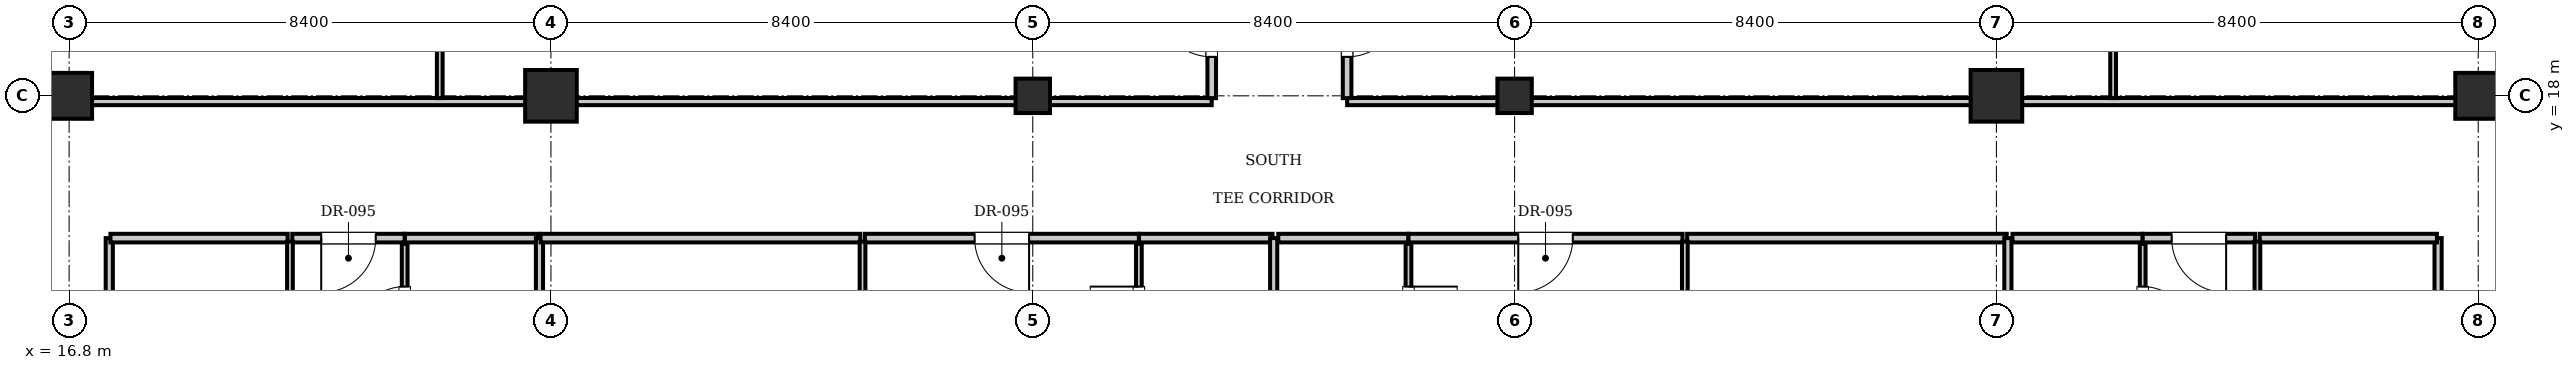
"""IFC4 building model, lengths in metres.
Left out: names, types, materials, properties, quantities, classifications, styles, units other than length and angle.
Written with IfcOpenShell. Run it as: python <this file> out.ifc"""

import sys

from ifc_helpers import new_model, si_unit, direction, frame, frame_2d, origin, origin_2d, place, context, subcontext, project, spatial, rectangle, i_section, extrude, element, fill, save


model = new_model("IFC4")
c1 = context("Model", 3, precision=1e-05, world=origin(), true_north=direction((0.0, 1.0)))
c2 = subcontext(c1, "Body", "Model", "MODEL_VIEW")
j1 = project(units=[si_unit("LENGTHUNIT", "METRE"), si_unit("PLANEANGLEUNIT", "RADIAN")], contexts=[c1])
p1 = place(None, origin())
s1 = spatial("IfcSite", under=j1, at=p1, CompositionType="ELEMENT")
p2 = place(p1, origin())
s2 = spatial("IfcBuilding", under=s1, at=p2, CompositionType="ELEMENT")
p3 = place(p2, frame((0.0, 0.0, 212.1)))
s3 = spatial("IfcBuildingStorey", under=s2, at=p3, CompositionType="ELEMENT", Elevation=212.1)
for number, where, z_axis, x_axis in (
    (1, (25.2, 18.0, 0.0), (0.0, 0.0, 1.0), (1.0, 0.0, 0.0)),
    (2, (50.4, 18.0, 0.0), (0.0, 0.0, 1.0), (1.0, 0.0, 0.0)),
):
    element("IfcColumn", number, at=place(p3, frame(where, z_axis=z_axis, x_axis=x_axis)), inside=s3, PredefinedType="COLUMN", context=c2, shape_type="SweptSolid", body=[
        extrude(rectangle(XDim=0.9, YDim=0.9, at=origin_2d()), origin(), (0.0, 0.0, 1.0), 3.85),
    ])
for number, where, z_axis, x_axis in (
    (3, (33.6, 18.0, 0.0), (0.0, 0.0, 1.0), (1.0, 0.0, 0.0)),
    (4, (42.0, 18.0, 0.0), (0.0, 0.0, 1.0), (1.0, 0.0, 0.0)),
):
    element("IfcColumn", number, at=place(p3, frame(where, z_axis=z_axis, x_axis=x_axis)), inside=s3, PredefinedType="COLUMN", context=c2, shape_type="SweptSolid", body=[
        extrude(i_section(OverallWidth=0.6, OverallDepth=0.6, WebThickness=0.025, FlangeThickness=0.038, at=origin_2d()), origin(), (0.0, 0.0, 1.0), 3.85),
    ])
for number, where, z_axis, x_axis in (
    (5, (16.8, 18.0, 0.0), (0.0, 0.0, 1.0), (1.0, 0.0, 0.0)),
    (6, (58.8, 18.0, 0.0), (0.0, 0.0, 1.0), (1.0, 0.0, 0.0)),
):
    element("IfcColumn", number, at=place(p3, frame(where, z_axis=z_axis, x_axis=x_axis)), inside=s3, PredefinedType="COLUMN", context=c2, shape_type="SweptSolid", body=[
        extrude(rectangle(XDim=0.8, YDim=0.8, at=origin_2d()), origin(), (0.0, 0.0, 1.0), 3.85),
    ])
for number, where, z_axis, x_axis in (
    (7, (17.5, 9.0, 0.0), (0.0, 0.0, 1.0), (0.0, 1.0, 0.0)),
    (8, (58.1, 9.0, 0.0), (0.0, 0.0, 1.0), (0.0, 1.0, 0.0)),
):
    element("IfcWall", number, at=place(p3, frame(where, z_axis=z_axis, x_axis=x_axis)), inside=s3, PredefinedType="PARTITIONING", context=c2, shape_type="SweptSolid", body=[
        extrude(rectangle(XDim=6.52, YDim=0.125, at=frame_2d((3.26, 0.0))), origin(), (0.0, 0.0, 1.0), 3.61),
    ])
p4 = place(p3, frame((22.65, 15.52, 0.0), z_axis=(0.0, 0.0, 1.0), x_axis=(1.0, 0.0, 0.0)))
e9 = element("IfcWall", 9, at=p4, inside=s3, PredefinedType="PARTITIONING", context=c2, shape_type="SweptSolid", body=[
    extrude(rectangle(XDim=2.33, YDim=0.15, at=frame_2d((1.165, 0.0))), origin(), (0.0, 0.0, 1.0), 3.61),
])
p5 = place(p3, frame((22.65, 13.08, 0.0), z_axis=(0.0, 0.0, 1.0), x_axis=(0.0, 1.0, 0.0)))
e10 = element("IfcWall", 10, at=p5, inside=s3, PredefinedType="PARTITIONING", context=c2, shape_type="SweptSolid", body=[
    extrude(rectangle(XDim=2.34, YDim=0.1, at=frame_2d((1.17, 0.0))), origin(), (0.0, 0.0, 1.0), 3.61),
])
p6 = place(p5, frame((0.745, 0.0, 0.0)))
e11 = element("IfcOpeningElement", 11, at=p6, cuts=e10, PredefinedType="OPENING", context=c2, shape_type="SweptSolid", body=[
    extrude(rectangle(XDim=0.85, YDim=2.1, at=frame_2d((0.425, 1.05))), frame((0.0, 0.06, 0.0), z_axis=(0.0, -1.0, 0.0), x_axis=(1.0, 0.0, 0.0)), (0.0, 0.0, 1.0), 0.12),
])
p7 = place(p3, frame((17.52, 15.52, 0.0), z_axis=(0.0, 0.0, 1.0), x_axis=(1.0, 0.0, 0.0)))
e12 = element("IfcWall", 12, at=p7, inside=s3, PredefinedType="PARTITIONING", context=c2, shape_type="SweptSolid", body=[
    extrude(rectangle(XDim=3.09, YDim=0.15, at=frame_2d((1.545, 0.0))), origin(), (0.0, 0.0, 1.0), 3.61),
])
p8 = place(p3, frame((20.69, 15.52, 0.0), z_axis=(0.0, 0.0, 1.0), x_axis=(1.0, 0.0, 0.0)))
e13 = element("IfcWall", 13, at=p8, inside=s3, PredefinedType="PARTITIONING", context=c2, shape_type="SweptSolid", body=[
    extrude(rectangle(XDim=1.96, YDim=0.15, at=frame_2d((0.98, 0.0))), origin(), (0.0, 0.0, 1.0), 3.61),
])
p9 = place(p8, frame((0.505, 0.0, 0.0)))
e14 = element("IfcOpeningElement", 14, at=p9, cuts=e13, PredefinedType="OPENING", context=c2, shape_type="SweptSolid", body=[
    extrude(rectangle(XDim=0.95, YDim=2.15, at=frame_2d((0.475, 1.075))), frame((0.0, 0.085, 0.0), z_axis=(0.0, -1.0, 0.0), x_axis=(1.0, 0.0, 0.0)), (0.0, 0.0, 1.0), 0.17),
])
p10 = place(p3, frame((20.65, 4.63, 0.0), z_axis=(0.0, 0.0, 1.0), x_axis=(0.0, 1.0, 0.0)))
e15 = element("IfcWall", 15, at=p10, inside=s3, PredefinedType="PARTITIONING", context=c2, shape_type="SweptSolid", body=[
    extrude(rectangle(XDim=10.83, YDim=0.1, at=frame_2d((5.415, 0.0))), origin(), (0.0, 0.0, 1.0), 3.61),
])
p11 = place(p10, frame((1.6, 0.0, 0.0)))
e16 = element("IfcOpeningElement", 16, at=p11, cuts=e15, PredefinedType="OPENING", context=c2, shape_type="SweptSolid", body=[
    extrude(rectangle(XDim=0.9, YDim=2.1, at=frame_2d((0.45, 1.05))), frame((0.0, 0.06, 0.0), z_axis=(0.0, -1.0, 0.0), x_axis=(1.0, 0.0, 0.0)), (0.0, 0.0, 1.0), 0.12),
])
p12 = place(p3, frame((25.0, 4.7, 0.0), z_axis=(0.0, 0.0, 1.0), x_axis=(0.0, 1.0, 0.0)))
e17 = element("IfcWall", 17, at=p12, inside=s3, PredefinedType="PARTITIONING", context=c2, shape_type="SweptSolid", body=[
    extrude(rectangle(XDim=10.82, YDim=0.125, at=frame_2d((5.41, 0.0))), origin(), (0.0, 0.0, 1.0), 3.61),
])
p13 = place(p3, frame((35.45, 15.52, 0.0), z_axis=(0.0, 0.0, 1.0), x_axis=(1.0, 0.0, 0.0)))
e18 = element("IfcWall", 18, at=p13, inside=s3, PredefinedType="PARTITIONING", context=c2, shape_type="SweptSolid", body=[
    extrude(rectangle(XDim=2.33, YDim=0.15, at=frame_2d((1.165, 0.0))), origin(), (0.0, 0.0, 1.0), 3.61),
])
p14 = place(p3, frame((35.45, 13.08, 0.0), z_axis=(0.0, 0.0, 1.0), x_axis=(0.0, 1.0, 0.0)))
e19 = element("IfcWall", 19, at=p14, inside=s3, PredefinedType="PARTITIONING", context=c2, shape_type="SweptSolid", body=[
    extrude(rectangle(XDim=2.34, YDim=0.1, at=frame_2d((1.17, 0.0))), origin(), (0.0, 0.0, 1.0), 3.61),
])
p15 = place(p14, frame((0.745, 0.0, 0.0)))
e20 = element("IfcOpeningElement", 20, at=p15, cuts=e19, PredefinedType="OPENING", context=c2, shape_type="SweptSolid", body=[
    extrude(rectangle(XDim=0.85, YDim=2.1, at=frame_2d((0.425, 1.05))), frame((0.0, 0.06, 0.0), z_axis=(0.0, -1.0, 0.0), x_axis=(1.0, 0.0, 0.0)), (0.0, 0.0, 1.0), 0.12),
])
p16 = place(p3, frame((25.02, 15.52, 0.0), z_axis=(0.0, 0.0, 1.0), x_axis=(1.0, 0.0, 0.0)))
e21 = element("IfcWall", 21, at=p16, inside=s3, PredefinedType="PARTITIONING", context=c2, shape_type="SweptSolid", body=[
    extrude(rectangle(XDim=5.572, YDim=0.15, at=frame_2d((2.786, 0.0))), origin(), (0.0, 0.0, 1.0), 3.61),
])
p17 = place(p3, frame((30.672, 15.52, 0.0), z_axis=(0.0, 0.0, 1.0), x_axis=(1.0, 0.0, 0.0)))
e22 = element("IfcWall", 22, at=p17, inside=s3, PredefinedType="PARTITIONING", context=c2, shape_type="SweptSolid", body=[
    extrude(rectangle(XDim=4.778, YDim=0.15, at=frame_2d((2.389, 0.0))), origin(), (0.0, 0.0, 1.0), 3.61),
])
p18 = place(p17, frame((1.914, 0.0, 0.0)))
e23 = element("IfcOpeningElement", 23, at=p18, cuts=e22, PredefinedType="OPENING", context=c2, shape_type="SweptSolid", body=[
    extrude(rectangle(XDim=0.95, YDim=2.15, at=frame_2d((0.475, 1.075))), frame((0.0, 0.085, 0.0), z_axis=(0.0, -1.0, 0.0), x_axis=(1.0, 0.0, 0.0)), (0.0, 0.0, 1.0), 0.17),
])
p19 = place(p3, frame((30.632, 4.63, 0.0), z_axis=(0.0, 0.0, 1.0), x_axis=(0.0, 1.0, 0.0)))
e24 = element("IfcWall", 24, at=p19, inside=s3, PredefinedType="PARTITIONING", context=c2, shape_type="SweptSolid", body=[
    extrude(rectangle(XDim=10.83, YDim=0.1, at=frame_2d((5.415, 0.0))), origin(), (0.0, 0.0, 1.0), 3.61),
])
p20 = place(p19, frame((1.6, 0.0, 0.0)))
e25 = element("IfcOpeningElement", 25, at=p20, cuts=e24, PredefinedType="OPENING", context=c2, shape_type="SweptSolid", body=[
    extrude(rectangle(XDim=0.9, YDim=2.1, at=frame_2d((0.45, 1.05))), frame((0.0, 0.06, 0.0), z_axis=(0.0, -1.0, 0.0), x_axis=(1.0, 0.0, 0.0)), (0.0, 0.0, 1.0), 0.12),
])
p21 = place(p3, frame((37.8, 4.7, 0.0), z_axis=(0.0, 0.0, 1.0), x_axis=(0.0, 1.0, 0.0)))
e26 = element("IfcWall", 26, at=p21, inside=s3, PredefinedType="PARTITIONING", context=c2, shape_type="SweptSolid", body=[
    extrude(rectangle(XDim=10.82, YDim=0.125, at=frame_2d((5.41, 0.0))), origin(), (0.0, 0.0, 1.0), 3.207),
])
p22 = place(p3, frame((37.88, 15.52, 0.0), z_axis=(0.0, 0.0, 1.0), x_axis=(1.0, 0.0, 0.0)))
e27 = element("IfcWall", 27, at=p22, inside=s3, PredefinedType="PARTITIONING", context=c2, shape_type="SweptSolid", body=[
    extrude(rectangle(XDim=2.27, YDim=0.15, at=frame_2d((1.135, 0.0))), origin(), (0.0, 0.0, 1.0), 3.61),
])
p23 = place(p3, frame((40.15, 13.08, 0.0), z_axis=(0.0, 0.0, 1.0), x_axis=(0.0, 1.0, 0.0)))
e28 = element("IfcWall", 28, at=p23, inside=s3, PredefinedType="PARTITIONING", context=c2, shape_type="SweptSolid", body=[
    extrude(rectangle(XDim=2.34, YDim=0.1, at=frame_2d((1.17, 0.0))), origin(), (0.0, 0.0, 1.0), 3.61),
])
p24 = place(p23, frame((0.745, 0.0, 0.0)))
e29 = element("IfcOpeningElement", 29, at=p24, cuts=e28, PredefinedType="OPENING", context=c2, shape_type="SweptSolid", body=[
    extrude(rectangle(XDim=0.85, YDim=2.1, at=frame_2d((0.425, 1.05))), frame((0.0, 0.06, 0.0), z_axis=(0.0, -1.0, 0.0), x_axis=(1.0, 0.0, 0.0)), (0.0, 0.0, 1.0), 0.12),
])
p25 = place(p3, frame((40.15, 15.52, 0.0), z_axis=(0.0, 0.0, 1.0), x_axis=(1.0, 0.0, 0.0)))
e30 = element("IfcWall", 30, at=p25, inside=s3, PredefinedType="PARTITIONING", context=c2, shape_type="SweptSolid", body=[
    extrude(rectangle(XDim=4.778, YDim=0.15, at=frame_2d((2.389, 0.0))), origin(), (0.0, 0.0, 1.0), 3.61),
])
p26 = place(p25, frame((1.914, 0.0, 0.0)))
e31 = element("IfcOpeningElement", 31, at=p26, cuts=e30, PredefinedType="OPENING", context=c2, shape_type="SweptSolid", body=[
    extrude(rectangle(XDim=0.95, YDim=2.15, at=frame_2d((0.475, 1.075))), frame((0.0, 0.085, 0.0), z_axis=(0.0, -1.0, 0.0), x_axis=(1.0, 0.0, 0.0)), (0.0, 0.0, 1.0), 0.17),
])
p27 = place(p3, frame((45.008, 15.52, 0.0), z_axis=(0.0, 0.0, 1.0), x_axis=(1.0, 0.0, 0.0)))
e32 = element("IfcWall", 32, at=p27, inside=s3, PredefinedType="PARTITIONING", context=c2, shape_type="SweptSolid", body=[
    extrude(rectangle(XDim=5.572, YDim=0.15, at=frame_2d((2.786, 0.0))), origin(), (0.0, 0.0, 1.0), 3.61),
])
p28 = place(p3, frame((44.968, 4.63, 0.0), z_axis=(0.0, 0.0, 1.0), x_axis=(0.0, 1.0, 0.0)))
e33 = element("IfcWall", 33, at=p28, inside=s3, PredefinedType="PARTITIONING", context=c2, shape_type="SweptSolid", body=[
    extrude(rectangle(XDim=10.83, YDim=0.1, at=frame_2d((5.415, 0.0))), origin(), (0.0, 0.0, 1.0), 3.61),
])
p29 = place(p28, frame((1.6, 0.0, 0.0)))
e34 = element("IfcOpeningElement", 34, at=p29, cuts=e33, PredefinedType="OPENING", context=c2, shape_type="SweptSolid", body=[
    extrude(rectangle(XDim=0.9, YDim=2.1, at=frame_2d((0.45, 1.05))), frame((0.0, 0.06, 0.0), z_axis=(0.0, -1.0, 0.0), x_axis=(1.0, 0.0, 0.0)), (0.0, 0.0, 1.0), 0.12),
])
p30 = place(p3, frame((50.6, 4.7, 0.0), z_axis=(0.0, 0.0, 1.0), x_axis=(0.0, 1.0, 0.0)))
e35 = element("IfcWall", 35, at=p30, inside=s3, PredefinedType="PARTITIONING", context=c2, shape_type="SweptSolid", body=[
    extrude(rectangle(XDim=10.82, YDim=0.125, at=frame_2d((5.41, 0.0))), origin(), (0.0, 0.0, 1.0), 3.61),
])
p31 = place(p3, frame((50.68, 15.52, 0.0), z_axis=(0.0, 0.0, 1.0), x_axis=(1.0, 0.0, 0.0)))
e36 = element("IfcWall", 36, at=p31, inside=s3, PredefinedType="PARTITIONING", context=c2, shape_type="SweptSolid", body=[
    extrude(rectangle(XDim=2.27, YDim=0.15, at=frame_2d((1.135, 0.0))), origin(), (0.0, 0.0, 1.0), 3.61),
])
p32 = place(p3, frame((52.95, 13.08, 0.0), z_axis=(0.0, 0.0, 1.0), x_axis=(0.0, 1.0, 0.0)))
e37 = element("IfcWall", 37, at=p32, inside=s3, PredefinedType="PARTITIONING", context=c2, shape_type="SweptSolid", body=[
    extrude(rectangle(XDim=2.34, YDim=0.1, at=frame_2d((1.17, 0.0))), origin(), (0.0, 0.0, 1.0), 3.61),
])
p33 = place(p32, frame((0.745, 0.0, 0.0)))
e38 = element("IfcOpeningElement", 38, at=p33, cuts=e37, PredefinedType="OPENING", context=c2, shape_type="SweptSolid", body=[
    extrude(rectangle(XDim=0.85, YDim=2.1, at=frame_2d((0.425, 1.05))), frame((0.0, 0.06, 0.0), z_axis=(0.0, -1.0, 0.0), x_axis=(1.0, 0.0, 0.0)), (0.0, 0.0, 1.0), 0.12),
])
p34 = place(p3, frame((52.95, 15.52, 0.0), z_axis=(0.0, 0.0, 1.0), x_axis=(1.0, 0.0, 0.0)))
e39 = element("IfcWall", 39, at=p34, inside=s3, PredefinedType="PARTITIONING", context=c2, shape_type="SweptSolid", body=[
    extrude(rectangle(XDim=1.96, YDim=0.15, at=frame_2d((0.98, 0.0))), origin(), (0.0, 0.0, 1.0), 3.61),
])
p35 = place(p34, frame((0.505, 0.0, 0.0)))
e40 = element("IfcOpeningElement", 40, at=p35, cuts=e39, PredefinedType="OPENING", context=c2, shape_type="SweptSolid", body=[
    extrude(rectangle(XDim=0.95, YDim=2.15, at=frame_2d((0.475, 1.075))), frame((0.0, 0.085, 0.0), z_axis=(0.0, -1.0, 0.0), x_axis=(1.0, 0.0, 0.0)), (0.0, 0.0, 1.0), 0.17),
])
p36 = place(p3, frame((54.99, 15.52, 0.0), z_axis=(0.0, 0.0, 1.0), x_axis=(1.0, 0.0, 0.0)))
e41 = element("IfcWall", 41, at=p36, inside=s3, PredefinedType="PARTITIONING", context=c2, shape_type="SweptSolid", body=[
    extrude(rectangle(XDim=3.09, YDim=0.15, at=frame_2d((1.545, 0.0))), origin(), (0.0, 0.0, 1.0), 3.61),
])
p37 = place(p3, frame((54.95, 4.63, 0.0), z_axis=(0.0, 0.0, 1.0), x_axis=(0.0, 1.0, 0.0)))
e42 = element("IfcWall", 42, at=p37, inside=s3, PredefinedType="PARTITIONING", context=c2, shape_type="SweptSolid", body=[
    extrude(rectangle(XDim=10.83, YDim=0.1, at=frame_2d((5.415, 0.0))), origin(), (0.0, 0.0, 1.0), 3.61),
])
p38 = place(p37, frame((1.6, 0.0, 0.0)))
e43 = element("IfcOpeningElement", 43, at=p38, cuts=e42, PredefinedType="OPENING", context=c2, shape_type="SweptSolid", body=[
    extrude(rectangle(XDim=0.9, YDim=2.1, at=frame_2d((0.45, 1.05))), frame((0.0, 0.06, 0.0), z_axis=(0.0, -1.0, 0.0), x_axis=(1.0, 0.0, 0.0)), (0.0, 0.0, 1.0), 0.12),
])
p39 = place(p3, frame((13.2, 17.9, 0.0), z_axis=(0.0, 0.0, 1.0), x_axis=(1.0, 0.0, 0.0)))
e44 = element("IfcWall", 44, at=p39, inside=s3, PredefinedType="PARTITIONING", context=c2, shape_type="SweptSolid", body=[
    extrude(rectangle(XDim=23.52, YDim=0.125, at=frame_2d((11.76, 0.0))), origin(), (0.0, 0.0, 1.0), 3.071),
])
p40 = place(p3, frame((39.08, 17.9, 0.0), z_axis=(0.0, 0.0, 1.0), x_axis=(1.0, 0.0, 0.0)))
e45 = element("IfcWall", 45, at=p40, inside=s3, PredefinedType="PARTITIONING", context=c2, shape_type="SweptSolid", body=[
    extrude(rectangle(XDim=23.32, YDim=0.125, at=frame_2d((11.66, 0.0))), origin(), (0.0, 0.0, 1.0), 3.071),
])
p41 = place(p3, frame((36.72, 17.96, 0.0), z_axis=(0.0, 0.0, 1.0), x_axis=(0.0, 1.0, 0.0)))
e46 = element("IfcWall", 46, at=p41, inside=s3, PredefinedType="PARTITIONING", context=c2, shape_type="SweptSolid", body=[
    extrude(rectangle(XDim=2.39, YDim=0.15, at=frame_2d((1.195, 0.0))), origin(), (0.0, 0.0, 1.0), 3.61),
])
p42 = place(p41, frame((0.72, 0.0, 0.0)))
e47 = element("IfcOpeningElement", 47, at=p42, cuts=e46, PredefinedType="OPENING", context=c2, shape_type="SweptSolid", body=[
    extrude(rectangle(XDim=0.95, YDim=2.15, at=frame_2d((0.475, 1.075))), frame((0.0, 0.085, 0.0), z_axis=(0.0, -1.0, 0.0), x_axis=(1.0, 0.0, 0.0)), (0.0, 0.0, 1.0), 0.17),
])
p43 = place(p3, frame((23.262, 17.96, 0.0), z_axis=(0.0, 0.0, 1.0), x_axis=(0.0, 1.0, 0.0)))
e48 = element("IfcWall", 48, at=p43, inside=s3, PredefinedType="PARTITIONING", context=c2, shape_type="SweptSolid", body=[
    extrude(rectangle(XDim=4.28, YDim=0.1, at=frame_2d((2.14, 0.0))), origin(), (0.0, 0.0, 1.0), 3.61),
])
p44 = place(p43, frame((1.69, 0.0, 0.0)))
e49 = element("IfcOpeningElement", 49, at=p44, cuts=e48, PredefinedType="OPENING", context=c2, shape_type="SweptSolid", body=[
    extrude(rectangle(XDim=0.9, YDim=2.1, at=frame_2d((0.45, 1.05))), frame((0.0, 0.06, 0.0), z_axis=(0.0, -1.0, 0.0), x_axis=(1.0, 0.0, 0.0)), (0.0, 0.0, 1.0), 0.12),
])
p45 = place(p3, frame((39.08, 17.96, 0.0), z_axis=(0.0, 0.0, 1.0), x_axis=(0.0, 1.0, 0.0)))
e50 = element("IfcWall", 50, at=p45, inside=s3, PredefinedType="PARTITIONING", context=c2, shape_type="SweptSolid", body=[
    extrude(rectangle(XDim=2.39, YDim=0.15, at=frame_2d((1.195, 0.0))), origin(), (0.0, 0.0, 1.0), 3.61),
])
p46 = place(p45, frame((0.72, 0.0, 0.0)))
e51 = element("IfcOpeningElement", 51, at=p46, cuts=e50, PredefinedType="OPENING", context=c2, shape_type="SweptSolid", body=[
    extrude(rectangle(XDim=0.95, YDim=2.15, at=frame_2d((0.475, 1.075))), frame((0.0, 0.085, 0.0), z_axis=(0.0, -1.0, 0.0), x_axis=(1.0, 0.0, 0.0)), (0.0, 0.0, 1.0), 0.17),
])
p47 = place(p3, frame((52.434, 17.96, 0.0), z_axis=(0.0, 0.0, 1.0), x_axis=(0.0, 1.0, 0.0)))
e52 = element("IfcWall", 52, at=p47, inside=s3, PredefinedType="PARTITIONING", context=c2, shape_type="SweptSolid", body=[
    extrude(rectangle(XDim=4.28, YDim=0.1, at=frame_2d((2.14, 0.0))), origin(), (0.0, 0.0, 1.0), 3.61),
])
p48 = place(p47, frame((1.69, 0.0, 0.0)))
e53 = element("IfcOpeningElement", 53, at=p48, cuts=e52, PredefinedType="OPENING", context=c2, shape_type="SweptSolid", body=[
    extrude(rectangle(XDim=0.9, YDim=2.1, at=frame_2d((0.45, 1.05))), frame((0.0, 0.06, 0.0), z_axis=(0.0, -1.0, 0.0), x_axis=(1.0, 0.0, 0.0)), (0.0, 0.0, 1.0), 0.12),
])
p49 = place(p6, origin())
e54 = element("IfcDoor", 54, at=p49, inside=s3, OperationType="SINGLE_SWING_LEFT", PredefinedType="DOOR", context=c2, shape_type="SweptSolid", body=[
    extrude(rectangle(XDim=0.85, YDim=2.1, at=frame_2d((0.425, 1.05))), frame((0.0, 0.025, 0.0), z_axis=(0.0, -1.0, 0.0), x_axis=(1.0, 0.0, 0.0)), (0.0, 0.0, 1.0), 0.05),
])
fill(e11, e54)
p50 = place(p9, frame((0.95, 0.0, 0.0), z_axis=(0.0, 0.0, 1.0), x_axis=(-1.0, 0.0, 0.0)))
e55 = element("IfcDoor", 55, at=p50, inside=s3, OperationType="SINGLE_SWING_RIGHT", PredefinedType="DOOR", context=c2, shape_type="SweptSolid", body=[
    extrude(rectangle(XDim=0.95, YDim=2.15, at=frame_2d((0.475, 1.075))), frame((0.0, 0.025, 0.0), z_axis=(0.0, -1.0, 0.0), x_axis=(1.0, 0.0, 0.0)), (0.0, 0.0, 1.0), 0.05),
])
fill(e14, e55)
p51 = place(p15, origin())
e56 = element("IfcDoor", 56, at=p51, inside=s3, OperationType="SINGLE_SWING_RIGHT", PredefinedType="DOOR", context=c2, shape_type="SweptSolid", body=[
    extrude(rectangle(XDim=0.85, YDim=2.1, at=frame_2d((0.425, 1.05))), frame((0.0, 0.025, 0.0), z_axis=(0.0, -1.0, 0.0), x_axis=(1.0, 0.0, 0.0)), (0.0, 0.0, 1.0), 0.05),
])
fill(e20, e56)
p52 = place(p18, frame((0.95, 0.0, 0.0), z_axis=(0.0, 0.0, 1.0), x_axis=(-1.0, 0.0, 0.0)))
e57 = element("IfcDoor", 57, at=p52, inside=s3, OperationType="SINGLE_SWING_LEFT", PredefinedType="DOOR", context=c2, shape_type="SweptSolid", body=[
    extrude(rectangle(XDim=0.95, YDim=2.15, at=frame_2d((0.475, 1.075))), frame((0.0, 0.025, 0.0), z_axis=(0.0, -1.0, 0.0), x_axis=(1.0, 0.0, 0.0)), (0.0, 0.0, 1.0), 0.05),
])
fill(e23, e57)
p53 = place(p24, frame((0.85, 0.0, 0.0), z_axis=(0.0, 0.0, 1.0), x_axis=(-1.0, 0.0, 0.0)))
e58 = element("IfcDoor", 58, at=p53, inside=s3, OperationType="SINGLE_SWING_LEFT", PredefinedType="DOOR", context=c2, shape_type="SweptSolid", body=[
    extrude(rectangle(XDim=0.85, YDim=2.1, at=frame_2d((0.425, 1.05))), frame((0.0, 0.025, 0.0), z_axis=(0.0, -1.0, 0.0), x_axis=(1.0, 0.0, 0.0)), (0.0, 0.0, 1.0), 0.05),
])
fill(e29, e58)
p54 = place(p26, frame((0.95, 0.0, 0.0), z_axis=(0.0, 0.0, 1.0), x_axis=(-1.0, 0.0, 0.0)))
e59 = element("IfcDoor", 59, at=p54, inside=s3, OperationType="SINGLE_SWING_RIGHT", PredefinedType="DOOR", context=c2, shape_type="SweptSolid", body=[
    extrude(rectangle(XDim=0.95, YDim=2.15, at=frame_2d((0.475, 1.075))), frame((0.0, 0.025, 0.0), z_axis=(0.0, -1.0, 0.0), x_axis=(1.0, 0.0, 0.0)), (0.0, 0.0, 1.0), 0.05),
])
fill(e31, e59)
p55 = place(p33, frame((0.85, 0.0, 0.0), z_axis=(0.0, 0.0, 1.0), x_axis=(-1.0, 0.0, 0.0)))
e60 = element("IfcDoor", 60, at=p55, inside=s3, OperationType="SINGLE_SWING_RIGHT", PredefinedType="DOOR", context=c2, shape_type="SweptSolid", body=[
    extrude(rectangle(XDim=0.85, YDim=2.1, at=frame_2d((0.425, 1.05))), frame((0.0, 0.025, 0.0), z_axis=(0.0, -1.0, 0.0), x_axis=(1.0, 0.0, 0.0)), (0.0, 0.0, 1.0), 0.05),
])
fill(e38, e60)
p56 = place(p35, frame((0.95, 0.0, 0.0), z_axis=(0.0, 0.0, 1.0), x_axis=(-1.0, 0.0, 0.0)))
e61 = element("IfcDoor", 61, at=p56, inside=s3, OperationType="SINGLE_SWING_LEFT", PredefinedType="DOOR", context=c2, shape_type="SweptSolid", body=[
    extrude(rectangle(XDim=0.95, YDim=2.15, at=frame_2d((0.475, 1.075))), frame((0.0, 0.025, 0.0), z_axis=(0.0, -1.0, 0.0), x_axis=(1.0, 0.0, 0.0)), (0.0, 0.0, 1.0), 0.05),
])
fill(e40, e61)
p57 = place(p42, origin())
e62 = element("IfcDoor", 62, at=p57, inside=s3, OperationType="SINGLE_SWING_RIGHT", PredefinedType="DOOR", context=c2, shape_type="SweptSolid", body=[
    extrude(rectangle(XDim=0.95, YDim=2.15, at=frame_2d((0.475, 1.075))), frame((0.0, 0.025, 0.0), z_axis=(0.0, -1.0, 0.0), x_axis=(1.0, 0.0, 0.0)), (0.0, 0.0, 1.0), 0.05),
])
fill(e47, e62)
p58 = place(p46, frame((0.95, 0.0, 0.0), z_axis=(0.0, 0.0, 1.0), x_axis=(-1.0, 0.0, 0.0)))
e63 = element("IfcDoor", 63, at=p58, inside=s3, OperationType="SINGLE_SWING_LEFT", PredefinedType="DOOR", context=c2, shape_type="SweptSolid", body=[
    extrude(rectangle(XDim=0.95, YDim=2.15, at=frame_2d((0.475, 1.075))), frame((0.0, 0.025, 0.0), z_axis=(0.0, -1.0, 0.0), x_axis=(1.0, 0.0, 0.0)), (0.0, 0.0, 1.0), 0.05),
])
fill(e51, e63)
save(model, sys.argv[1])
